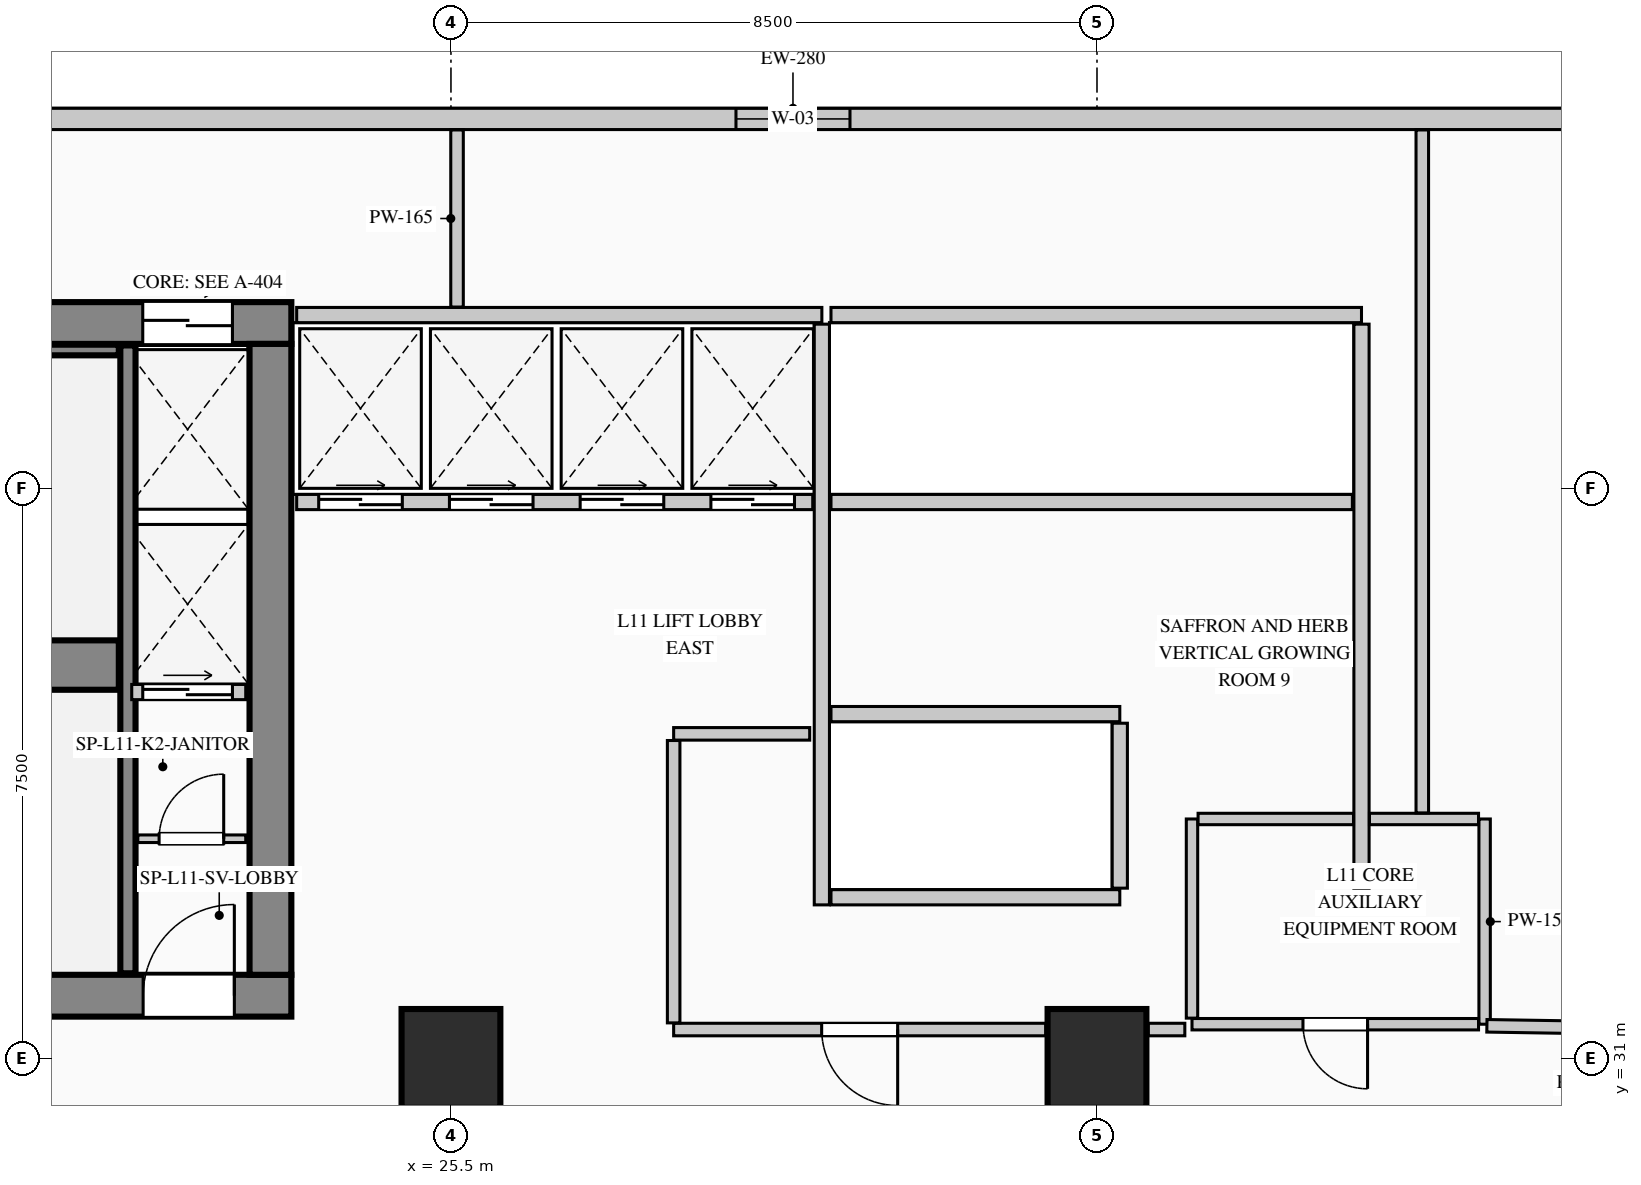
"""IFC4 building model, lengths in metres.
Left out: names, types, materials, properties, quantities, classifications, styles, units other than length and angle.
Written with IfcOpenShell. Run it as: python <this file> out.ifc"""

import sys

from ifc_helpers import new_model, si_unit, direction, frame, frame_2d, origin, origin_2d, place, context, subcontext, project, spatial, rectangle, extrude, element, fill, save


model = new_model("IFC4")
c1 = context("Model", 3, precision=1e-05, world=origin(), true_north=direction((0.0, 1.0)))
c2 = subcontext(c1, "Body", "Model", "MODEL_VIEW")
j1 = project(units=[si_unit("LENGTHUNIT", "METRE"), si_unit("PLANEANGLEUNIT", "RADIAN")], contexts=[c1])
p1 = place(None, origin())
s1 = spatial("IfcSite", under=j1, at=p1, CompositionType="ELEMENT")
p2 = place(p1, origin())
s2 = spatial("IfcBuilding", under=s1, at=p2, CompositionType="ELEMENT")
p3 = place(p2, frame((0.0, 0.0, 49.0)))
s3 = spatial("IfcBuildingStorey", under=s2, at=p3, CompositionType="ELEMENT", Elevation=49.0)
p4 = place(p3, frame((5.45, 40.675, 0.0), z_axis=(0.0, 0.0, 1.0), x_axis=(1.0, 0.0, 0.0)))
e1 = element("IfcWall", 1, at=p4, inside=s3, PredefinedType="SHEAR", context=c2, shape_type="SweptSolid", body=[
    extrude(rectangle(XDim=17.95, YDim=0.55, at=frame_2d((8.975, 0.0))), origin(), (0.0, 0.0, 1.0), 4.4),
])
p5 = place(p4, frame((15.995, 0.0, 0.0)))
e2 = element("IfcOpeningElement", 2, at=p5, cuts=e1, PredefinedType="OPENING", context=c2, shape_type="SweptSolid", body=[
    extrude(rectangle(XDim=1.18, YDim=2.25, at=frame_2d((0.59, 1.125))), frame((0.0, 0.285, 0.0), z_axis=(0.0, -1.0, 0.0), x_axis=(1.0, 0.0, 0.0)), (0.0, 0.0, 1.0), 0.57),
])
p6 = place(p3, frame((5.45, 31.825, 0.0), z_axis=(0.0, 0.0, 1.0), x_axis=(1.0, 0.0, 0.0)))
e3 = element("IfcWall", 3, at=p6, inside=s3, PredefinedType="SHEAR", context=c2, shape_type="SweptSolid", body=[
    extrude(rectangle(XDim=17.95, YDim=0.55, at=frame_2d((8.975, 0.0))), origin(), (0.0, 0.0, 1.0), 4.4),
])
p7 = place(p6, frame((3.2, 0.0, 0.0)))
e4 = element("IfcOpeningElement", 4, at=p7, cuts=e3, PredefinedType="OPENING", context=c2, shape_type="SweptSolid", body=[
    extrude(rectangle(XDim=1.2, YDim=2.2, at=frame_2d((0.6, 1.1))), frame((0.0, 0.285, 0.0), z_axis=(0.0, -1.0, 0.0), x_axis=(1.0, 0.0, 0.0)), (0.0, 0.0, 1.0), 0.57),
])
p8 = place(p6, frame((7.05, 0.0, 0.0)))
e5 = element("IfcOpeningElement", 5, at=p8, cuts=e3, PredefinedType="OPENING", context=c2, shape_type="SweptSolid", body=[
    extrude(rectangle(XDim=1.2, YDim=2.2, at=frame_2d((0.6, 1.1))), frame((0.0, 0.285, 0.0), z_axis=(0.0, -1.0, 0.0), x_axis=(1.0, 0.0, 0.0)), (0.0, 0.0, 1.0), 0.57),
])
p9 = place(p6, frame((8.9, 0.0, 0.0)))
e6 = element("IfcOpeningElement", 6, at=p9, cuts=e3, PredefinedType="OPENING", context=c2, shape_type="SweptSolid", body=[
    extrude(rectangle(XDim=1.15, YDim=2.2, at=frame_2d((0.575, 1.1))), frame((0.0, 0.285, 0.0), z_axis=(0.0, -1.0, 0.0), x_axis=(1.0, 0.0, 0.0)), (0.0, 0.0, 1.0), 0.57),
])
p10 = place(p6, frame((16.0, 0.0, 0.0)))
e7 = element("IfcOpeningElement", 7, at=p10, cuts=e3, PredefinedType="OPENING", context=c2, shape_type="SweptSolid", body=[
    extrude(rectangle(XDim=1.2, YDim=2.2, at=frame_2d((0.6, 1.1))), frame((0.0, 0.285, 0.0), z_axis=(0.0, -1.0, 0.0), x_axis=(1.0, 0.0, 0.0)), (0.0, 0.0, 1.0), 0.57),
])
p11 = place(p3, frame((23.125, 32.1, 0.0), z_axis=(0.0, 0.0, 1.0), x_axis=(0.0, 1.0, 0.0)))
e8 = element("IfcWall", 8, at=p11, inside=s3, PredefinedType="SHEAR", context=c2, shape_type="SweptSolid", body=[
    extrude(rectangle(XDim=8.3, YDim=0.55, at=frame_2d((4.15, 0.0))), origin(), (0.0, 0.0, 1.0), 4.4),
])
p12 = place(p3, frame((14.12, 36.175, 0.0), z_axis=(0.0, 0.0, 1.0), x_axis=(1.0, 0.0, 0.0)))
e9 = element("IfcWall", 9, at=p12, inside=s3, PredefinedType="SHEAR", context=c2, shape_type="SweptSolid", body=[
    extrude(rectangle(XDim=7.01, YDim=0.65, at=frame_2d((3.505, 0.0))), origin(), (0.0, 0.0, 1.0), 4.4),
])
p13 = place(p3, frame((21.25, 32.12, 0.0), z_axis=(0.0, 0.0, 1.0), x_axis=(0.0, 1.0, 0.0)))
e10 = element("IfcWall", 10, at=p13, inside=s3, PredefinedType="SHEAR", context=c2, shape_type="SweptSolid", body=[
    extrude(rectangle(XDim=8.26, YDim=0.2, at=frame_2d((4.13, 0.0))), origin(), (0.0, 0.0, 1.0), 4.4),
])
p14 = place(p3, frame((14.12, 40.32, 0.0), z_axis=(0.0, 0.0, 1.0), x_axis=(1.0, 0.0, 0.0)))
e11 = element("IfcWall", 11, at=p14, inside=s3, PredefinedType="SHEAR", context=c2, shape_type="SweptSolid", body=[
    extrude(rectangle(XDim=7.01, YDim=0.14, at=frame_2d((3.505, 0.0))), origin(), (0.0, 0.0, 1.0), 4.4),
])
for number, where, z_axis, x_axis in (
    (12, (25.5, 31.0, 0.0), (0.0, 0.0, 1.0), (1.0, 0.0, 0.0)),
    (13, (34.0, 31.0, 0.0), (0.0, 0.0, 1.0), (1.0, 0.0, 0.0)),
):
    element("IfcColumn", number, at=place(p3, frame(where, z_axis=z_axis, x_axis=x_axis)), inside=s3, PredefinedType="COLUMN", context=c2, shape_type="SweptSolid", body=[
        extrude(rectangle(XDim=1.3, YDim=1.3, at=origin_2d()), origin(), (0.0, 0.0, 1.0), 4.4),
    ])
p15 = place(p3, frame((4.84, 43.36, 0.0), z_axis=(0.0, 0.0, 1.0), x_axis=(1.0, 0.0, 0.0)))
e14 = element("IfcWall", 14, at=p15, inside=s3, PredefinedType="STANDARD", context=c2, shape_type="SweptSolid", body=[
    extrude(rectangle(XDim=50.32, YDim=0.28, at=frame_2d((25.16, 0.0))), origin(), (0.0, 0.0, 1.0), 4.1),
])
p16 = place(p15, frame((24.41, 0.0, 0.9)))
e15 = element("IfcOpeningElement", 15, at=p16, cuts=e14, PredefinedType="OPENING", context=c2, shape_type="SweptSolid", body=[
    extrude(rectangle(XDim=1.5, YDim=1.8, at=frame_2d((0.75, 0.9))), frame((0.0, 0.15, 0.0), z_axis=(0.0, -1.0, 0.0), x_axis=(1.0, 0.0, 0.0)), (0.0, 0.0, 1.0), 0.3),
])
p17 = place(p3, frame((21.38, 33.89, 0.0), z_axis=(0.0, 0.0, 1.0), x_axis=(1.0, 0.0, 0.0)))
e16 = element("IfcWall", 16, at=p17, inside=s3, PredefinedType="PARTITIONING", context=c2, shape_type="SweptSolid", body=[
    extrude(rectangle(XDim=1.42, YDim=0.1, at=frame_2d((0.71, 0.0))), origin(), (0.0, 0.0, 1.0), 4.1),
])
p18 = place(p17, frame((0.28, 0.0, 0.0)))
e17 = element("IfcOpeningElement", 17, at=p18, cuts=e16, PredefinedType="OPENING", context=c2, shape_type="SweptSolid", body=[
    extrude(rectangle(XDim=0.85, YDim=2.1, at=frame_2d((0.425, 1.05))), frame((0.0, 0.06, 0.0), z_axis=(0.0, -1.0, 0.0), x_axis=(1.0, 0.0, 0.0)), (0.0, 0.0, 1.0), 0.12),
])
p19 = place(p3, frame((21.3, 35.82, 0.0), z_axis=(0.0, 0.0, 1.0), x_axis=(1.0, 0.0, 0.0)))
e18 = element("IfcWall", 18, at=p19, inside=s3, PredefinedType="PARTITIONING", context=c2, shape_type="SweptSolid", body=[
    extrude(rectangle(XDim=1.5, YDim=0.2, at=frame_2d((0.75, 0.0))), origin(), (0.0, 0.0, 1.0), 4.1),
])
p20 = place(p19, frame((0.145, 0.0, 0.0)))
e19 = element("IfcOpeningElement", 19, at=p20, cuts=e18, PredefinedType="OPENING", context=c2, shape_type="SweptSolid", body=[
    extrude(rectangle(XDim=1.18, YDim=2.25, at=frame_2d((0.59, 1.125))), frame((0.0, 0.11, 0.0), z_axis=(0.0, -1.0, 0.0), x_axis=(1.0, 0.0, 0.0)), (0.0, 0.0, 1.0), 0.22),
])
p21 = place(p3, frame((23.47, 40.78, 0.0), z_axis=(0.0, 0.0, 1.0), x_axis=(1.0, 0.0, 0.0)))
e20 = element("IfcWall", 20, at=p21, inside=s3, PredefinedType="PARTITIONING", context=c2, shape_type="SweptSolid", body=[
    extrude(rectangle(XDim=6.91, YDim=0.2, at=frame_2d((3.455, 0.0))), origin(), (0.0, 0.0, 1.0), 4.1),
])
p22 = place(p3, frame((30.38, 33.02, 0.0), z_axis=(0.0, 0.0, 1.0), x_axis=(0.0, 1.0, 0.0)))
e21 = element("IfcWall", 21, at=p22, inside=s3, PredefinedType="PARTITIONING", context=c2, shape_type="SweptSolid", body=[
    extrude(rectangle(XDim=7.64, YDim=0.2, at=frame_2d((3.82, 0.0))), origin(), (0.0, 0.0, 1.0), 4.1),
])
p23 = place(p3, frame((23.47, 38.32, 0.0), z_axis=(0.0, 0.0, 1.0), x_axis=(1.0, 0.0, 0.0)))
e22 = element("IfcWall", 22, at=p23, inside=s3, PredefinedType="PARTITIONING", context=c2, shape_type="SweptSolid", body=[
    extrude(rectangle(XDim=6.79, YDim=0.2, at=frame_2d((3.395, 0.0))), origin(), (0.0, 0.0, 1.0), 4.1),
])
p24 = place(p23, frame((0.29, 0.0, 0.0)))
e23 = element("IfcOpeningElement", 23, at=p24, cuts=e22, PredefinedType="OPENING", context=c2, shape_type="SweptSolid", body=[
    extrude(rectangle(XDim=1.1, YDim=2.2, at=frame_2d((0.55, 1.1))), frame((0.0, 0.11, 0.0), z_axis=(0.0, -1.0, 0.0), x_axis=(1.0, 0.0, 0.0)), (0.0, 0.0, 1.0), 0.22),
])
p25 = place(p23, frame((2.01, 0.0, 0.0)))
e24 = element("IfcOpeningElement", 24, at=p25, cuts=e22, PredefinedType="OPENING", context=c2, shape_type="SweptSolid", body=[
    extrude(rectangle(XDim=1.1, YDim=2.2, at=frame_2d((0.55, 1.1))), frame((0.0, 0.11, 0.0), z_axis=(0.0, -1.0, 0.0), x_axis=(1.0, 0.0, 0.0)), (0.0, 0.0, 1.0), 0.22),
])
p26 = place(p23, frame((3.73, 0.0, 0.0)))
e25 = element("IfcOpeningElement", 25, at=p26, cuts=e22, PredefinedType="OPENING", context=c2, shape_type="SweptSolid", body=[
    extrude(rectangle(XDim=1.1, YDim=2.2, at=frame_2d((0.55, 1.1))), frame((0.0, 0.11, 0.0), z_axis=(0.0, -1.0, 0.0), x_axis=(1.0, 0.0, 0.0)), (0.0, 0.0, 1.0), 0.22),
])
p27 = place(p23, frame((5.45, 0.0, 0.0)))
e26 = element("IfcOpeningElement", 26, at=p27, cuts=e22, PredefinedType="OPENING", context=c2, shape_type="SweptSolid", body=[
    extrude(rectangle(XDim=1.1, YDim=2.2, at=frame_2d((0.55, 1.1))), frame((0.0, 0.11, 0.0), z_axis=(0.0, -1.0, 0.0), x_axis=(1.0, 0.0, 0.0)), (0.0, 0.0, 1.0), 0.22),
])
p28 = place(p3, frame((30.5, 40.78, 0.0), z_axis=(0.0, 0.0, 1.0), x_axis=(1.0, 0.0, 0.0)))
e27 = element("IfcWall", 27, at=p28, inside=s3, PredefinedType="PARTITIONING", context=c2, shape_type="SweptSolid", body=[
    extrude(rectangle(XDim=6.98, YDim=0.2, at=frame_2d((3.49, 0.0))), origin(), (0.0, 0.0, 1.0), 4.1),
])
p29 = place(p3, frame((37.48, 33.24, 0.0), z_axis=(0.0, 0.0, 1.0), x_axis=(0.0, 1.0, 0.0)))
e28 = element("IfcWall", 28, at=p29, inside=s3, PredefinedType="PARTITIONING", context=c2, shape_type="SweptSolid", body=[
    extrude(rectangle(XDim=7.42, YDim=0.2, at=frame_2d((3.71, 0.0))), origin(), (0.0, 0.0, 1.0), 4.1),
])
p30 = place(p3, frame((30.5, 38.32, 0.0), z_axis=(0.0, 0.0, 1.0), x_axis=(1.0, 0.0, 0.0)))
e29 = element("IfcWall", 29, at=p30, inside=s3, PredefinedType="PARTITIONING", context=c2, shape_type="SweptSolid", body=[
    extrude(rectangle(XDim=6.86, YDim=0.2, at=frame_2d((3.43, 0.0))), origin(), (0.0, 0.0, 1.0), 4.1),
])
for number, where, z_axis, x_axis in (
    (30, (30.5, 35.53, 0.0), (0.0, 0.0, 1.0), (1.0, 0.0, 0.0)),
    (31, (30.5, 33.12, 0.0), (0.0, 0.0, 1.0), (1.0, 0.0, 0.0)),
):
    element("IfcWall", number, at=place(p3, frame(where, z_axis=z_axis, x_axis=x_axis)), inside=s3, PredefinedType="PARTITIONING", context=c2, shape_type="SweptSolid", body=[
        extrude(rectangle(XDim=3.8, YDim=0.2, at=frame_2d((1.9, 0.0))), origin(), (0.0, 0.0, 1.0), 4.1),
    ])
p31 = place(p3, frame((34.3, 33.24, 0.0), z_axis=(0.0, 0.0, 1.0), x_axis=(0.0, 1.0, 0.0)))
e32 = element("IfcWall", 32, at=p31, inside=s3, PredefinedType="PARTITIONING", context=c2, shape_type="SweptSolid", body=[
    extrude(rectangle(XDim=2.17, YDim=0.2, at=frame_2d((1.085, 0.0))), origin(), (0.0, 0.0, 1.0), 4.1),
])
p32 = place(p3, frame((39.1, 34.15, 0.0), z_axis=(0.0, 0.0, 1.0), x_axis=(0.0, -1.0, 0.0)))
e33 = element("IfcWall", 33, at=p32, inside=s3, PredefinedType="PARTITIONING", context=c2, shape_type="SweptSolid", body=[
    extrude(rectangle(XDim=2.7, YDim=0.15, at=frame_2d((1.35, 0.0))), origin(), (0.0, 0.0, 1.0), 4.1),
])
p33 = place(p3, frame((39.02, 31.45, 0.0), z_axis=(0.0, 0.0, 1.0), x_axis=(-1.0, 0.0, 0.0)))
e34 = element("IfcWall", 34, at=p33, inside=s3, PredefinedType="PARTITIONING", context=c2, shape_type="SweptSolid", body=[
    extrude(rectangle(XDim=3.77, YDim=0.15, at=frame_2d((1.885, 0.0))), origin(), (0.0, 0.0, 1.0), 4.1),
])
p34 = place(p33, frame((1.46, 0.0, 0.0)))
e35 = element("IfcOpeningElement", 35, at=p34, cuts=e34, PredefinedType="OPENING", context=c2, shape_type="SweptSolid", body=[
    extrude(rectangle(XDim=0.85, YDim=2.1, at=frame_2d((0.425, 1.05))), frame((0.0, 0.085, 0.0), z_axis=(0.0, -1.0, 0.0), x_axis=(1.0, 0.0, 0.0)), (0.0, 0.0, 1.0), 0.17),
])
p35 = place(p3, frame((35.25, 31.53, 0.0), z_axis=(0.0, 0.0, 1.0), x_axis=(0.0, 1.0, 0.0)))
e36 = element("IfcWall", 36, at=p35, inside=s3, PredefinedType="PARTITIONING", context=c2, shape_type="SweptSolid", body=[
    extrude(rectangle(XDim=2.62, YDim=0.15, at=frame_2d((1.31, 0.0))), origin(), (0.0, 0.0, 1.0), 4.1),
])
p36 = place(p3, frame((37.585, 34.15, 0.0), z_axis=(0.0, 0.0, 1.0), x_axis=(1.0, 0.0, 0.0)))
e37 = element("IfcWall", 37, at=p36, inside=s3, PredefinedType="PARTITIONING", context=c2, shape_type="SweptSolid", body=[
    extrude(rectangle(XDim=1.435, YDim=0.15, at=frame_2d((0.718, 0.0))), origin(), (0.0, 0.0, 1.0), 4.1),
])
p37 = place(p3, frame((35.33, 34.15, 0.0), z_axis=(0.0, 0.0, 1.0), x_axis=(1.0, 0.0, 0.0)))
e38 = element("IfcWall", 38, at=p37, inside=s3, PredefinedType="PARTITIONING", context=c2, shape_type="SweptSolid", body=[
    extrude(rectangle(XDim=2.045, YDim=0.15, at=frame_2d((1.022, 0.0))), origin(), (0.0, 0.0, 1.0), 4.1),
])
p38 = place(p3, frame((38.28, 34.23, 0.0), z_axis=(0.0, 0.0, 1.0), x_axis=(0.0, 1.0, 0.0)))
e39 = element("IfcWall", 39, at=p38, inside=s3, PredefinedType="PARTITIONING", context=c2, shape_type="SweptSolid", body=[
    extrude(rectangle(XDim=8.985, YDim=0.165, at=frame_2d((4.493, 0.0))), origin(), (0.0, 0.0, 1.0), 4.1),
])
p39 = place(p3, frame((41.825, 31.386, 0.0), z_axis=(0.0, 0.0, 1.0), x_axis=(-0.999874366695, 0.015850893575, 0.0)))
e40 = element("IfcWall", 40, at=p39, inside=s3, PredefinedType="PARTITIONING", context=c2, shape_type="SweptSolid", body=[
    extrude(rectangle(XDim=2.695, YDim=0.165, at=frame_2d((1.348, 0.0))), origin(), (0.0, 0.0, 1.0), 4.1),
])
p40 = place(p3, frame((28.43, 35.27, 0.0), z_axis=(0.0, 0.0, 1.0), x_axis=(1.0, 0.0, 0.0)))
e41 = element("IfcWall", 41, at=p40, inside=s3, PredefinedType="PARTITIONING", context=c2, shape_type="SweptSolid", body=[
    extrude(rectangle(XDim=1.79, YDim=0.165, at=frame_2d((0.895, 0.0))), origin(), (0.0, 0.0, 1.0), 4.1),
])
p41 = place(p3, frame((25.58, 40.885, 0.0), z_axis=(0.0, 0.0, 1.0), x_axis=(0.0, 1.0, 0.0)))
e42 = element("IfcWall", 42, at=p41, inside=s3, PredefinedType="PARTITIONING", context=c2, shape_type="SweptSolid", body=[
    extrude(rectangle(XDim=2.33, YDim=0.165, at=frame_2d((1.165, 0.0))), origin(), (0.0, 0.0, 1.0), 4.1),
])
p42 = place(p3, frame((35.156, 31.38, 0.0), z_axis=(0.0, 0.0, 1.0), x_axis=(-1.0, 0.0, 0.0)))
e43 = element("IfcWall", 43, at=p42, inside=s3, PredefinedType="PARTITIONING", context=c2, shape_type="SweptSolid", body=[
    extrude(rectangle(XDim=0.48, YDim=0.165, at=frame_2d((0.24, 0.0))), origin(), (0.0, 0.0, 1.0), 4.1),
])
p43 = place(p3, frame((33.325, 31.38, 0.0), z_axis=(0.0, 0.0, 1.0), x_axis=(-1.0, 0.0, 0.0)))
e44 = element("IfcWall", 44, at=p43, inside=s3, PredefinedType="PARTITIONING", context=c2, shape_type="SweptSolid", body=[
    extrude(rectangle(XDim=4.895, YDim=0.165, at=frame_2d((2.448, 0.0))), origin(), (0.0, 0.0, 1.0), 4.1),
])
p44 = place(p43, frame((1.948, 0.0, 0.0)))
e45 = element("IfcOpeningElement", 45, at=p44, cuts=e44, PredefinedType="OPENING", context=c2, shape_type="SweptSolid", body=[
    extrude(rectangle(XDim=1.0, YDim=2.15, at=frame_2d((0.5, 1.075))), frame((0.0, 0.093, 0.0), z_axis=(0.0, -1.0, 0.0), x_axis=(1.0, 0.0, 0.0)), (0.0, 0.0, 1.0), 0.185),
])
p45 = place(p3, frame((28.43, 31.468, 0.0), z_axis=(0.0, 0.0, 1.0), x_axis=(0.0, 1.0, 0.0)))
e46 = element("IfcWall", 46, at=p45, inside=s3, PredefinedType="PARTITIONING", context=c2, shape_type="SweptSolid", body=[
    extrude(rectangle(XDim=3.715, YDim=0.165, at=frame_2d((1.857, 0.0))), origin(), (0.0, 0.0, 1.0), 4.1),
])
p46 = place(p16, origin())
e47 = element("IfcWindow", 47, at=p46, inside=s3, PartitioningType="SINGLE_PANEL", PredefinedType="WINDOW", context=c2, shape_type="SweptSolid", body=[
    extrude(rectangle(XDim=1.5, YDim=1.8, at=frame_2d((0.75, 0.9))), frame((0.0, 0.03, 0.0), z_axis=(0.0, -1.0, 0.0), x_axis=(1.0, 0.0, 0.0)), (0.0, 0.0, 1.0), 0.06),
])
fill(e15, e47)
p47 = place(p10, origin())
e48 = element("IfcDoor", 48, at=p47, inside=s3, OperationType="SINGLE_SWING_RIGHT", PredefinedType="DOOR", context=c2, shape_type="SweptSolid", body=[
    extrude(rectangle(XDim=1.2, YDim=2.2, at=frame_2d((0.6, 1.1))), frame((0.0, 0.025, 0.0), z_axis=(0.0, -1.0, 0.0), x_axis=(1.0, 0.0, 0.0)), (0.0, 0.0, 1.0), 0.05),
])
fill(e7, e48)
p48 = place(p18, origin())
e49 = element("IfcDoor", 49, at=p48, inside=s3, OperationType="SINGLE_SWING_RIGHT", PredefinedType="DOOR", context=c2, shape_type="SweptSolid", body=[
    extrude(rectangle(XDim=0.85, YDim=2.1, at=frame_2d((0.425, 1.05))), frame((0.0, 0.025, 0.0), z_axis=(0.0, -1.0, 0.0), x_axis=(1.0, 0.0, 0.0)), (0.0, 0.0, 1.0), 0.05),
])
fill(e17, e49)
p49 = place(p5, origin())
e50 = element("IfcDoor", 50, at=p49, inside=s3, OperationType="DOUBLE_DOOR_SLIDING", PredefinedType="DOOR", context=c2, shape_type="SweptSolid", body=[
    extrude(rectangle(XDim=1.18, YDim=2.25, at=frame_2d((0.59, 1.125))), frame((0.0, 0.025, 0.0), z_axis=(0.0, -1.0, 0.0), x_axis=(1.0, 0.0, 0.0)), (0.0, 0.0, 1.0), 0.05),
])
fill(e2, e50)
p50 = place(p20, origin())
e51 = element("IfcDoor", 51, at=p50, inside=s3, OperationType="DOUBLE_DOOR_SLIDING", PredefinedType="DOOR", context=c2, shape_type="SweptSolid", body=[
    extrude(rectangle(XDim=1.18, YDim=2.25, at=frame_2d((0.59, 1.125))), frame((0.0, 0.025, 0.0), z_axis=(0.0, -1.0, 0.0), x_axis=(1.0, 0.0, 0.0)), (0.0, 0.0, 1.0), 0.05),
])
fill(e19, e51)
p51 = place(p24, origin())
e52 = element("IfcDoor", 52, at=p51, inside=s3, OperationType="DOUBLE_DOOR_SLIDING", PredefinedType="DOOR", context=c2, shape_type="SweptSolid", body=[
    extrude(rectangle(XDim=1.1, YDim=2.2, at=frame_2d((0.55, 1.1))), frame((0.0, 0.025, 0.0), z_axis=(0.0, -1.0, 0.0), x_axis=(1.0, 0.0, 0.0)), (0.0, 0.0, 1.0), 0.05),
])
fill(e23, e52)
p52 = place(p25, origin())
e53 = element("IfcDoor", 53, at=p52, inside=s3, OperationType="DOUBLE_DOOR_SLIDING", PredefinedType="DOOR", context=c2, shape_type="SweptSolid", body=[
    extrude(rectangle(XDim=1.1, YDim=2.2, at=frame_2d((0.55, 1.1))), frame((0.0, 0.025, 0.0), z_axis=(0.0, -1.0, 0.0), x_axis=(1.0, 0.0, 0.0)), (0.0, 0.0, 1.0), 0.05),
])
fill(e24, e53)
p53 = place(p26, origin())
e54 = element("IfcDoor", 54, at=p53, inside=s3, OperationType="DOUBLE_DOOR_SLIDING", PredefinedType="DOOR", context=c2, shape_type="SweptSolid", body=[
    extrude(rectangle(XDim=1.1, YDim=2.2, at=frame_2d((0.55, 1.1))), frame((0.0, 0.025, 0.0), z_axis=(0.0, -1.0, 0.0), x_axis=(1.0, 0.0, 0.0)), (0.0, 0.0, 1.0), 0.05),
])
fill(e25, e54)
p54 = place(p27, origin())
e55 = element("IfcDoor", 55, at=p54, inside=s3, OperationType="DOUBLE_DOOR_SLIDING", PredefinedType="DOOR", context=c2, shape_type="SweptSolid", body=[
    extrude(rectangle(XDim=1.1, YDim=2.2, at=frame_2d((0.55, 1.1))), frame((0.0, 0.025, 0.0), z_axis=(0.0, -1.0, 0.0), x_axis=(1.0, 0.0, 0.0)), (0.0, 0.0, 1.0), 0.05),
])
fill(e26, e55)
p55 = place(p34, origin())
e56 = element("IfcDoor", 56, at=p55, inside=s3, OperationType="SINGLE_SWING_LEFT", PredefinedType="DOOR", context=c2, shape_type="SweptSolid", body=[
    extrude(rectangle(XDim=0.85, YDim=2.1, at=frame_2d((0.425, 1.05))), frame((0.0, 0.025, 0.0), z_axis=(0.0, -1.0, 0.0), x_axis=(1.0, 0.0, 0.0)), (0.0, 0.0, 1.0), 0.05),
])
fill(e35, e56)
p56 = place(p44, origin())
e57 = element("IfcDoor", 57, at=p56, inside=s3, OperationType="SINGLE_SWING_LEFT", PredefinedType="DOOR", context=c2, shape_type="SweptSolid", body=[
    extrude(rectangle(XDim=1.0, YDim=2.15, at=frame_2d((0.5, 1.075))), frame((0.0, 0.025, 0.0), z_axis=(0.0, -1.0, 0.0), x_axis=(1.0, 0.0, 0.0)), (0.0, 0.0, 1.0), 0.05),
])
fill(e45, e57)
save(model, sys.argv[1])
